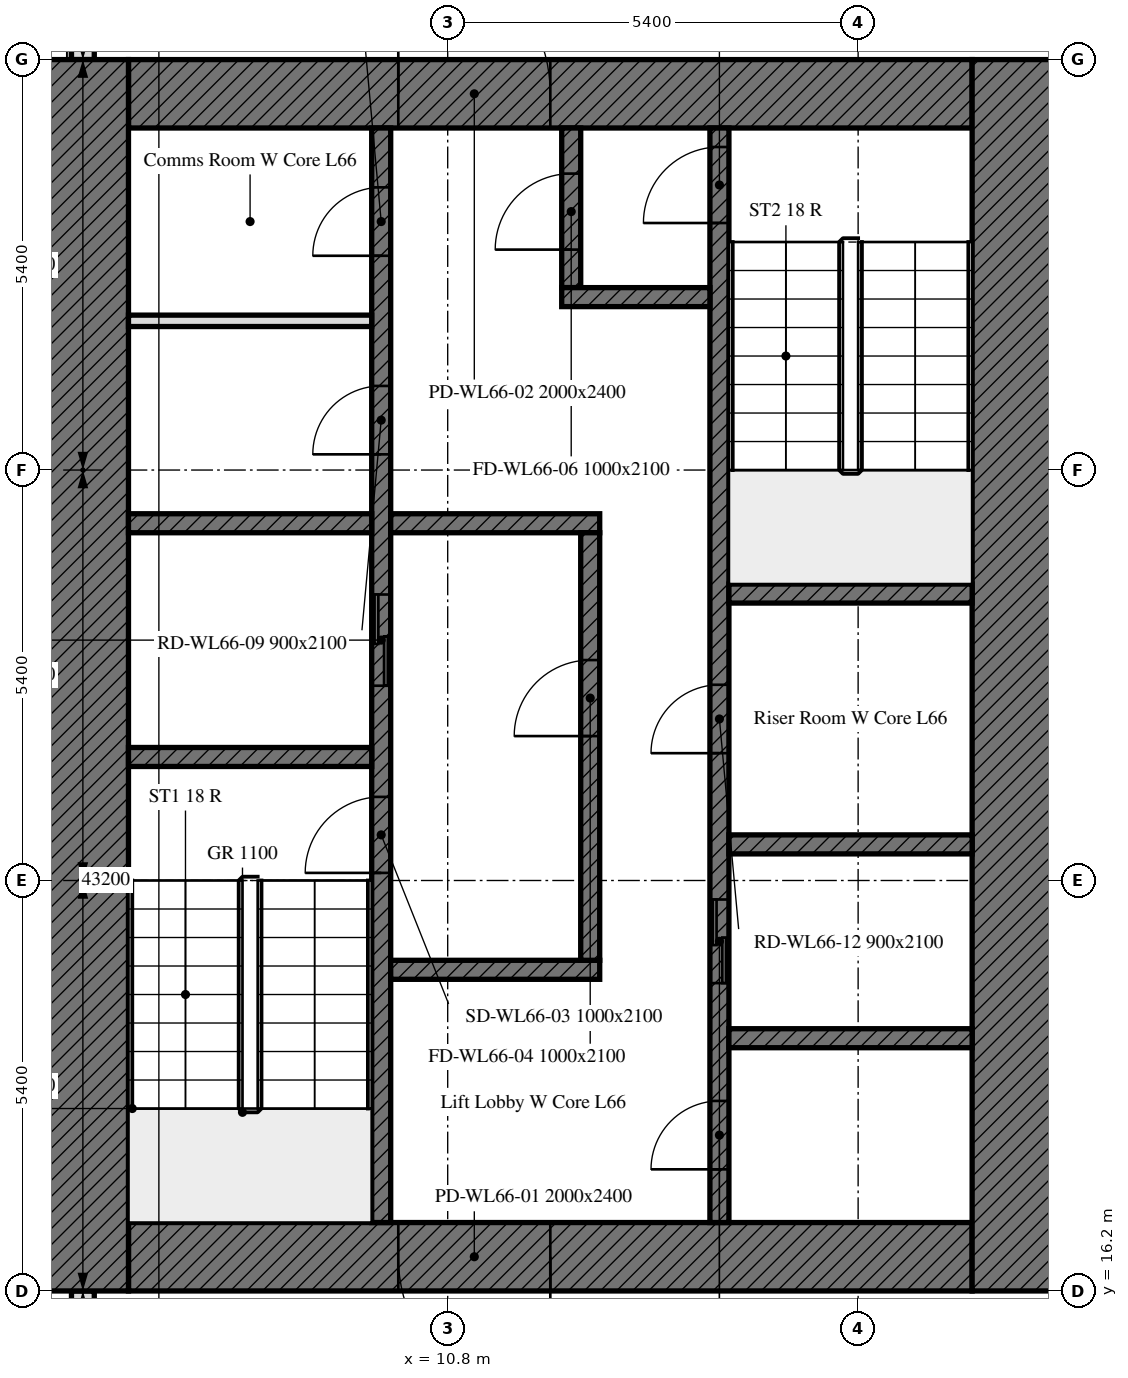
"""IFC4 building model, lengths in metres.
Left out: names, types, materials, properties, quantities, classifications, styles, units other than length and angle.
Written with IfcOpenShell. Run it as: python <this file> out.ifc"""

import sys

from ifc_helpers import new_model, si_unit, direction, frame, frame_2d, origin, place, context, subcontext, project, spatial, rectangle, extrude, element, fill, save


model = new_model("IFC4")
c1 = context("Model", 3, precision=1e-05, world=origin(), true_north=direction((0.0, 1.0)))
c2 = subcontext(c1, "Body", "Model", "MODEL_VIEW")
j1 = project(units=[si_unit("LENGTHUNIT", "METRE"), si_unit("PLANEANGLEUNIT", "RADIAN")], contexts=[c1])
p1 = place(None, origin())
s1 = spatial("IfcSite", under=j1, at=p1, CompositionType="ELEMENT")
p2 = place(p1, origin())
s2 = spatial("IfcBuilding", under=s1, at=p2, CompositionType="ELEMENT")
p3 = place(p2, frame((0.0, 0.0, 271.9)))
s3 = spatial("IfcBuildingStorey", under=s2, at=p3, CompositionType="ELEMENT", Elevation=271.9)
p4 = place(p3, frame((6.0, 37.614, 0.0), z_axis=(0.0, 0.0, 1.0), x_axis=(0.0, -1.0, 0.0)))
e1 = element("IfcWall", 1, at=p4, inside=s3, PredefinedType="SOLIDWALL", context=c2, shape_type="SweptSolid", body=[
    extrude(rectangle(XDim=5.214, YDim=0.3, at=frame_2d((2.607, 0.0))), origin(), (0.0, 0.0, 1.0), 3.0),
])
p5 = place(p4, frame((1.164, 0.0, 0.9)))
e2 = element("IfcOpeningElement", 2, at=p5, cuts=e1, PredefinedType="OPENING", context=c2, shape_type="SweptSolid", body=[
    extrude(rectangle(XDim=1.1, YDim=1.7, at=frame_2d((0.55, 0.85))), frame((0.0, 0.16, 0.0), z_axis=(0.0, -1.0, 0.0), x_axis=(1.0, 0.0, 0.0)), (0.0, 0.0, 1.0), 0.32),
])
p6 = place(p4, frame((3.139, 0.0, 0.9)))
e3 = element("IfcOpeningElement", 3, at=p6, cuts=e1, PredefinedType="OPENING", context=c2, shape_type="SweptSolid", body=[
    extrude(rectangle(XDim=0.65, YDim=1.7, at=frame_2d((0.325, 0.85))), frame((0.0, 0.16, 0.0), z_axis=(0.0, -1.0, 0.0), x_axis=(1.0, 0.0, 0.0)), (0.0, 0.0, 1.0), 0.32),
])
p7 = place(p3, frame((6.0, 16.2, 0.0), z_axis=(0.0, 0.0, 1.0), x_axis=(0.0, -1.0, 0.0)))
e4 = element("IfcWall", 4, at=p7, inside=s3, PredefinedType="SOLIDWALL", context=c2, shape_type="SweptSolid", body=[
    extrude(rectangle(XDim=10.614, YDim=0.3, at=frame_2d((5.307, 0.0))), origin(), (0.0, 0.0, 1.0), 3.0),
])
p8 = place(p7, frame((1.0, 0.0, 0.9)))
e5 = element("IfcOpeningElement", 5, at=p8, cuts=e4, PredefinedType="OPENING", context=c2, shape_type="SweptSolid", body=[
    extrude(rectangle(XDim=1.1, YDim=1.7, at=frame_2d((0.55, 0.85))), frame((0.0, 0.16, 0.0), z_axis=(0.0, -1.0, 0.0), x_axis=(1.0, 0.0, 0.0)), (0.0, 0.0, 1.0), 0.32),
])
p9 = place(p7, frame((2.95, 0.0, 0.9)))
e6 = element("IfcOpeningElement", 6, at=p9, cuts=e4, PredefinedType="OPENING", context=c2, shape_type="SweptSolid", body=[
    extrude(rectangle(XDim=1.1, YDim=1.7, at=frame_2d((0.55, 0.85))), frame((0.0, 0.16, 0.0), z_axis=(0.0, -1.0, 0.0), x_axis=(1.0, 0.0, 0.0)), (0.0, 0.0, 1.0), 0.32),
])
p10 = place(p7, frame((6.75, 0.0, 0.9)))
e7 = element("IfcOpeningElement", 7, at=p10, cuts=e4, PredefinedType="OPENING", context=c2, shape_type="SweptSolid", body=[
    extrude(rectangle(XDim=1.1, YDim=1.7, at=frame_2d((0.55, 0.85))), frame((0.0, 0.16, 0.0), z_axis=(0.0, -1.0, 0.0), x_axis=(1.0, 0.0, 0.0)), (0.0, 0.0, 1.0), 0.32),
])
p11 = place(p7, frame((8.2, 0.0, 0.9)))
e8 = element("IfcOpeningElement", 8, at=p11, cuts=e4, PredefinedType="OPENING", context=c2, shape_type="SweptSolid", body=[
    extrude(rectangle(XDim=1.1, YDim=1.7, at=frame_2d((0.55, 0.85))), frame((0.0, 0.16, 0.0), z_axis=(0.0, -1.0, 0.0), x_axis=(1.0, 0.0, 0.0)), (0.0, 0.0, 1.0), 0.32),
])
p12 = place(p3, frame((17.7, 16.65, 0.0), z_axis=(0.0, 0.0, 1.0), x_axis=(-1.0, 0.0, 0.0)))
e9 = element("IfcWall", 9, at=p12, inside=s3, PredefinedType="SOLIDWALL", context=c2, shape_type="SweptSolid", body=[
    extrude(rectangle(XDim=11.1, YDim=0.9, at=frame_2d((5.55, 0.0))), origin(), (0.0, 0.0, 1.0), 3.0),
])
p13 = place(p12, frame((5.55, 0.0, 0.0)))
e10 = element("IfcOpeningElement", 10, at=p13, cuts=e9, PredefinedType="OPENING", context=c2, shape_type="SweptSolid", body=[
    extrude(rectangle(XDim=2.0, YDim=2.4, at=frame_2d((1.0, 1.2))), frame((0.0, 0.45, 0.0), z_axis=(0.0, -1.0, 0.0), x_axis=(1.0, 0.0, 0.0)), (0.0, 0.0, 1.0), 0.9),
])
p14 = place(p3, frame((6.6, 31.95, 0.0), z_axis=(0.0, 0.0, 1.0), x_axis=(1.0, 0.0, 0.0)))
e11 = element("IfcWall", 11, at=p14, inside=s3, PredefinedType="SOLIDWALL", context=c2, shape_type="SweptSolid", body=[
    extrude(rectangle(XDim=11.1, YDim=0.9, at=frame_2d((5.55, 0.0))), origin(), (0.0, 0.0, 1.0), 3.0),
])
p15 = place(p14, frame((3.55, 0.0, 0.0)))
e12 = element("IfcOpeningElement", 12, at=p15, cuts=e11, PredefinedType="OPENING", context=c2, shape_type="SweptSolid", body=[
    extrude(rectangle(XDim=2.0, YDim=2.4, at=frame_2d((1.0, 1.2))), frame((0.0, 0.45, 0.0), z_axis=(0.0, -1.0, 0.0), x_axis=(1.0, 0.0, 0.0)), (0.0, 0.0, 1.0), 0.9),
])
for number, where, z_axis, x_axis in (
    (13, (6.0, 16.2, 0.0), (0.0, 0.0, 1.0), (0.0, 1.0, 0.0)),
    (14, (18.3, 32.4, 0.0), (0.0, 0.0, 1.0), (0.0, -1.0, 0.0)),
):
    element("IfcWall", number, at=place(p3, frame(where, z_axis=z_axis, x_axis=x_axis)), inside=s3, PredefinedType="SOLIDWALL", context=c2, shape_type="SweptSolid", body=[
        extrude(rectangle(XDim=16.2, YDim=1.2, at=frame_2d((8.1, 0.0))), origin(), (0.0, 0.0, 1.0), 3.0),
    ])
p16 = place(p3, frame((9.925, 17.1, 0.0), z_axis=(0.0, 0.0, 1.0), x_axis=(0.0, 1.0, 0.0)))
e15 = element("IfcWall", 15, at=p16, inside=s3, PredefinedType="SOLIDWALL", context=c2, shape_type="SweptSolid", body=[
    extrude(rectangle(XDim=14.4, YDim=0.25, at=frame_2d((7.2, 0.0))), origin(), (0.0, 0.0, 1.0), 3.0),
])
p17 = place(p16, frame((4.6, 0.0, 0.0)))
e16 = element("IfcOpeningElement", 16, at=p17, cuts=e15, PredefinedType="OPENING", context=c2, shape_type="SweptSolid", body=[
    extrude(rectangle(XDim=1.0, YDim=2.1, at=frame_2d((0.5, 1.05))), frame((0.0, 0.125, 0.0), z_axis=(0.0, -1.0, 0.0), x_axis=(1.0, 0.0, 0.0)), (0.0, 0.0, 1.0), 0.25),
])
p18 = place(p16, frame((7.062, 0.0, 0.0)))
e17 = element("IfcOpeningElement", 17, at=p18, cuts=e15, PredefinedType="OPENING", context=c2, shape_type="SweptSolid", body=[
    extrude(rectangle(XDim=1.2, YDim=2.1, at=frame_2d((0.6, 1.05))), frame((0.0, 0.125, 0.0), z_axis=(0.0, -1.0, 0.0), x_axis=(1.0, 0.0, 0.0)), (0.0, 0.0, 1.0), 0.25),
])
p19 = place(p16, frame((10.106, 0.0, 0.0)))
e18 = element("IfcOpeningElement", 18, at=p19, cuts=e15, PredefinedType="OPENING", context=c2, shape_type="SweptSolid", body=[
    extrude(rectangle(XDim=0.9, YDim=2.1, at=frame_2d((0.45, 1.05))), frame((0.0, 0.125, 0.0), z_axis=(0.0, -1.0, 0.0), x_axis=(1.0, 0.0, 0.0)), (0.0, 0.0, 1.0), 0.25),
])
p20 = place(p16, frame((12.719, 0.0, 0.0)))
e19 = element("IfcOpeningElement", 19, at=p20, cuts=e15, PredefinedType="OPENING", context=c2, shape_type="SweptSolid", body=[
    extrude(rectangle(XDim=0.9, YDim=2.1, at=frame_2d((0.45, 1.05))), frame((0.0, 0.125, 0.0), z_axis=(0.0, -1.0, 0.0), x_axis=(1.0, 0.0, 0.0)), (0.0, 0.0, 1.0), 0.25),
])
p21 = place(p3, frame((14.375, 17.1, 0.0), z_axis=(0.0, 0.0, 1.0), x_axis=(0.0, 1.0, 0.0)))
e20 = element("IfcWall", 20, at=p21, inside=s3, PredefinedType="SOLIDWALL", context=c2, shape_type="SweptSolid", body=[
    extrude(rectangle(XDim=14.4, YDim=0.25, at=frame_2d((7.2, 0.0))), origin(), (0.0, 0.0, 1.0), 3.0),
])
p22 = place(p21, frame((13.15, 0.0, 0.0)))
e21 = element("IfcOpeningElement", 21, at=p22, cuts=e20, PredefinedType="OPENING", context=c2, shape_type="SweptSolid", body=[
    extrude(rectangle(XDim=1.0, YDim=2.1, at=frame_2d((0.5, 1.05))), frame((0.0, 0.125, 0.0), z_axis=(0.0, -1.0, 0.0), x_axis=(1.0, 0.0, 0.0)), (0.0, 0.0, 1.0), 0.25),
])
p23 = place(p21, frame((3.15, 0.0, 0.0)))
e22 = element("IfcOpeningElement", 22, at=p23, cuts=e20, PredefinedType="OPENING", context=c2, shape_type="SweptSolid", body=[
    extrude(rectangle(XDim=1.1, YDim=2.1, at=frame_2d((0.55, 1.05))), frame((0.0, 0.125, 0.0), z_axis=(0.0, -1.0, 0.0), x_axis=(1.0, 0.0, 0.0)), (0.0, 0.0, 1.0), 0.25),
])
p24 = place(p21, frame((0.7, 0.0, 0.0)))
e23 = element("IfcOpeningElement", 23, at=p24, cuts=e20, PredefinedType="OPENING", context=c2, shape_type="SweptSolid", body=[
    extrude(rectangle(XDim=0.9, YDim=2.1, at=frame_2d((0.45, 1.05))), frame((0.0, 0.125, 0.0), z_axis=(0.0, -1.0, 0.0), x_axis=(1.0, 0.0, 0.0)), (0.0, 0.0, 1.0), 0.25),
])
p25 = place(p21, frame((6.175, 0.0, 0.0)))
e24 = element("IfcOpeningElement", 24, at=p25, cuts=e20, PredefinedType="OPENING", context=c2, shape_type="SweptSolid", body=[
    extrude(rectangle(XDim=0.9, YDim=2.1, at=frame_2d((0.45, 1.05))), frame((0.0, 0.125, 0.0), z_axis=(0.0, -1.0, 0.0), x_axis=(1.0, 0.0, 0.0)), (0.0, 0.0, 1.0), 0.25),
])
for number, where, z_axis, x_axis in (
    (25, (6.6, 23.225, 0.0), (0.0, 0.0, 1.0), (1.0, 0.0, 0.0)),
    (26, (14.5, 25.375, 0.0), (0.0, 0.0, 1.0), (1.0, 0.0, 0.0)),
    (27, (14.5, 22.075, 0.0), (0.0, 0.0, 1.0), (1.0, 0.0, 0.0)),
    (28, (6.6, 26.3, 0.0), (0.0, 0.0, 1.0), (1.0, 0.0, 0.0)),
):
    element("IfcWall", number, at=place(p3, frame(where, z_axis=z_axis, x_axis=x_axis)), inside=s3, PredefinedType="SOLIDWALL", context=c2, shape_type="SweptSolid", body=[
        extrude(rectangle(XDim=3.2, YDim=0.25, at=frame_2d((1.6, 0.0))), origin(), (0.0, 0.0, 1.0), 3.0),
    ])
for number, where, z_axis, x_axis in (
    (29, (10.05, 26.3, 0.0), (0.0, 0.0, 1.0), (1.0, 0.0, 0.0)),
    (30, (10.05, 20.425, 0.0), (0.0, 0.0, 1.0), (1.0, 0.0, 0.0)),
):
    element("IfcWall", number, at=place(p3, frame(where, z_axis=z_axis, x_axis=x_axis)), inside=s3, PredefinedType="SOLIDWALL", context=c2, shape_type="SweptSolid", body=[
        extrude(rectangle(XDim=2.75, YDim=0.25, at=frame_2d((1.375, 0.0))), origin(), (0.0, 0.0, 1.0), 3.0),
    ])
p26 = place(p3, frame((12.425, 29.4, 0.0), z_axis=(0.0, 0.0, 1.0), x_axis=(0.0, 1.0, 0.0)))
e31 = element("IfcWall", 31, at=p26, inside=s3, PredefinedType="SOLIDWALL", context=c2, shape_type="SweptSolid", body=[
    extrude(rectangle(XDim=2.1, YDim=0.25, at=frame_2d((1.05, 0.0))), origin(), (0.0, 0.0, 1.0), 3.0),
])
p27 = place(p26, frame((0.5, 0.0, 0.0)))
e32 = element("IfcOpeningElement", 32, at=p27, cuts=e31, PredefinedType="OPENING", context=c2, shape_type="SweptSolid", body=[
    extrude(rectangle(XDim=1.0, YDim=2.1, at=frame_2d((0.5, 1.05))), frame((0.0, 0.125, 0.0), z_axis=(0.0, -1.0, 0.0), x_axis=(1.0, 0.0, 0.0)), (0.0, 0.0, 1.0), 0.25),
])
p28 = place(p3, frame((12.3, 29.275, 0.0), z_axis=(0.0, 0.0, 1.0), x_axis=(1.0, 0.0, 0.0)))
e33 = element("IfcWall", 33, at=p28, inside=s3, PredefinedType="SOLIDWALL", context=c2, shape_type="SweptSolid", body=[
    extrude(rectangle(XDim=1.95, YDim=0.25, at=frame_2d((0.975, 0.0))), origin(), (0.0, 0.0, 1.0), 3.0),
])
p29 = place(p3, frame((12.675, 20.55, 0.0), z_axis=(0.0, 0.0, 1.0), x_axis=(0.0, 1.0, 0.0)))
e34 = element("IfcWall", 34, at=p29, inside=s3, PredefinedType="SOLIDWALL", context=c2, shape_type="SweptSolid", body=[
    extrude(rectangle(XDim=5.625, YDim=0.25, at=frame_2d((2.812, 0.0))), origin(), (0.0, 0.0, 1.0), 3.0),
])
p30 = place(p29, frame((2.95, 0.0, 0.0)))
e35 = element("IfcOpeningElement", 35, at=p30, cuts=e34, PredefinedType="OPENING", context=c2, shape_type="SweptSolid", body=[
    extrude(rectangle(XDim=1.0, YDim=2.1, at=frame_2d((0.5, 1.05))), frame((0.0, 0.125, 0.0), z_axis=(0.0, -1.0, 0.0), x_axis=(1.0, 0.0, 0.0)), (0.0, 0.0, 1.0), 0.25),
])
p31 = place(p3, frame((14.5, 19.525, 0.0), z_axis=(0.0, 0.0, 1.0), x_axis=(1.0, 0.0, 0.0)))
e36 = element("IfcWall", 36, at=p31, inside=s3, PredefinedType="SOLIDWALL", context=c2, shape_type="SweptSolid", body=[
    extrude(rectangle(XDim=3.2, YDim=0.25, at=frame_2d((1.6, 0.0))), origin(), (0.0, 0.0, 1.0), 3.0),
])
p32 = place(p3, frame((6.6, 28.963, 0.0), z_axis=(0.0, 0.0, 1.0), x_axis=(1.0, 0.0, 0.0)))
e37 = element("IfcWall", 37, at=p32, inside=s3, PredefinedType="PARTITIONING", context=c2, shape_type="SweptSolid", body=[
    extrude(rectangle(XDim=3.2, YDim=0.15, at=frame_2d((1.6, 0.0))), origin(), (0.0, 0.0, 1.0), 3.0),
])
p33 = place(p13, origin())
e38 = element("IfcDoor", 38, at=p33, inside=s3, OperationType="DOUBLE_DOOR_SINGLE_SWING", PredefinedType="DOOR", context=c2, shape_type="SweptSolid", body=[
    extrude(rectangle(XDim=2.0, YDim=2.4, at=frame_2d((1.0, 1.2))), frame((0.0, 0.025, 0.0), z_axis=(0.0, -1.0, 0.0), x_axis=(1.0, 0.0, 0.0)), (0.0, 0.0, 1.0), 0.05),
])
fill(e10, e38)
p34 = place(p15, origin())
e39 = element("IfcDoor", 39, at=p34, inside=s3, OperationType="DOUBLE_DOOR_SINGLE_SWING", PredefinedType="DOOR", context=c2, shape_type="SweptSolid", body=[
    extrude(rectangle(XDim=2.0, YDim=2.4, at=frame_2d((1.0, 1.2))), frame((0.0, 0.025, 0.0), z_axis=(0.0, -1.0, 0.0), x_axis=(1.0, 0.0, 0.0)), (0.0, 0.0, 1.0), 0.05),
])
fill(e12, e39)
p35 = place(p17, origin())
e40 = element("IfcDoor", 40, at=p35, inside=s3, OperationType="SINGLE_SWING_LEFT", PredefinedType="DOOR", context=c2, shape_type="SweptSolid", body=[
    extrude(rectangle(XDim=1.0, YDim=2.1, at=frame_2d((0.5, 1.05))), frame((0.0, 0.025, 0.0), z_axis=(0.0, -1.0, 0.0), x_axis=(1.0, 0.0, 0.0)), (0.0, 0.0, 1.0), 0.05),
])
fill(e16, e40)
p36 = place(p30, origin())
e41 = element("IfcDoor", 41, at=p36, inside=s3, OperationType="SINGLE_SWING_LEFT", PredefinedType="DOOR", context=c2, shape_type="SweptSolid", body=[
    extrude(rectangle(XDim=1.0, YDim=2.1, at=frame_2d((0.5, 1.05))), frame((0.0, 0.025, 0.0), z_axis=(0.0, -1.0, 0.0), x_axis=(1.0, 0.0, 0.0)), (0.0, 0.0, 1.0), 0.05),
])
fill(e35, e41)
p37 = place(p22, origin())
e42 = element("IfcDoor", 42, at=p37, inside=s3, OperationType="SINGLE_SWING_LEFT", PredefinedType="DOOR", context=c2, shape_type="SweptSolid", body=[
    extrude(rectangle(XDim=1.0, YDim=2.1, at=frame_2d((0.5, 1.05))), frame((0.0, 0.025, 0.0), z_axis=(0.0, -1.0, 0.0), x_axis=(1.0, 0.0, 0.0)), (0.0, 0.0, 1.0), 0.05),
])
fill(e21, e42)
p38 = place(p27, origin())
e43 = element("IfcDoor", 43, at=p38, inside=s3, OperationType="SINGLE_SWING_LEFT", PredefinedType="DOOR", context=c2, shape_type="SweptSolid", body=[
    extrude(rectangle(XDim=1.0, YDim=2.1, at=frame_2d((0.5, 1.05))), frame((0.0, 0.025, 0.0), z_axis=(0.0, -1.0, 0.0), x_axis=(1.0, 0.0, 0.0)), (0.0, 0.0, 1.0), 0.05),
])
fill(e32, e43)
p39 = place(p18, origin())
e44 = element("IfcDoor", 44, at=p39, inside=s3, OperationType="DOUBLE_DOOR_SLIDING", PredefinedType="DOOR", context=c2, shape_type="SweptSolid", body=[
    extrude(rectangle(XDim=1.2, YDim=2.1, at=frame_2d((0.6, 1.05))), frame((0.0, 0.025, 0.0), z_axis=(0.0, -1.0, 0.0), x_axis=(1.0, 0.0, 0.0)), (0.0, 0.0, 1.0), 0.05),
])
fill(e17, e44)
p40 = place(p23, origin())
e45 = element("IfcDoor", 45, at=p40, inside=s3, OperationType="DOUBLE_DOOR_SLIDING", PredefinedType="DOOR", context=c2, shape_type="SweptSolid", body=[
    extrude(rectangle(XDim=1.1, YDim=2.1, at=frame_2d((0.55, 1.05))), frame((0.0, 0.025, 0.0), z_axis=(0.0, -1.0, 0.0), x_axis=(1.0, 0.0, 0.0)), (0.0, 0.0, 1.0), 0.05),
])
fill(e22, e45)
p41 = place(p19, origin())
e46 = element("IfcDoor", 46, at=p41, inside=s3, OperationType="SINGLE_SWING_LEFT", PredefinedType="DOOR", context=c2, shape_type="SweptSolid", body=[
    extrude(rectangle(XDim=0.9, YDim=2.1, at=frame_2d((0.45, 1.05))), frame((0.0, 0.025, 0.0), z_axis=(0.0, -1.0, 0.0), x_axis=(1.0, 0.0, 0.0)), (0.0, 0.0, 1.0), 0.05),
])
fill(e18, e46)
p42 = place(p20, origin())
e47 = element("IfcDoor", 47, at=p42, inside=s3, OperationType="SINGLE_SWING_LEFT", PredefinedType="DOOR", context=c2, shape_type="SweptSolid", body=[
    extrude(rectangle(XDim=0.9, YDim=2.1, at=frame_2d((0.45, 1.05))), frame((0.0, 0.025, 0.0), z_axis=(0.0, -1.0, 0.0), x_axis=(1.0, 0.0, 0.0)), (0.0, 0.0, 1.0), 0.05),
])
fill(e19, e47)
p43 = place(p24, origin())
e48 = element("IfcDoor", 48, at=p43, inside=s3, OperationType="SINGLE_SWING_LEFT", PredefinedType="DOOR", context=c2, shape_type="SweptSolid", body=[
    extrude(rectangle(XDim=0.9, YDim=2.1, at=frame_2d((0.45, 1.05))), frame((0.0, 0.025, 0.0), z_axis=(0.0, -1.0, 0.0), x_axis=(1.0, 0.0, 0.0)), (0.0, 0.0, 1.0), 0.05),
])
fill(e23, e48)
p44 = place(p25, origin())
e49 = element("IfcDoor", 49, at=p44, inside=s3, OperationType="SINGLE_SWING_LEFT", PredefinedType="DOOR", context=c2, shape_type="SweptSolid", body=[
    extrude(rectangle(XDim=0.9, YDim=2.1, at=frame_2d((0.45, 1.05))), frame((0.0, 0.025, 0.0), z_axis=(0.0, -1.0, 0.0), x_axis=(1.0, 0.0, 0.0)), (0.0, 0.0, 1.0), 0.05),
])
fill(e24, e49)
save(model, sys.argv[1])
